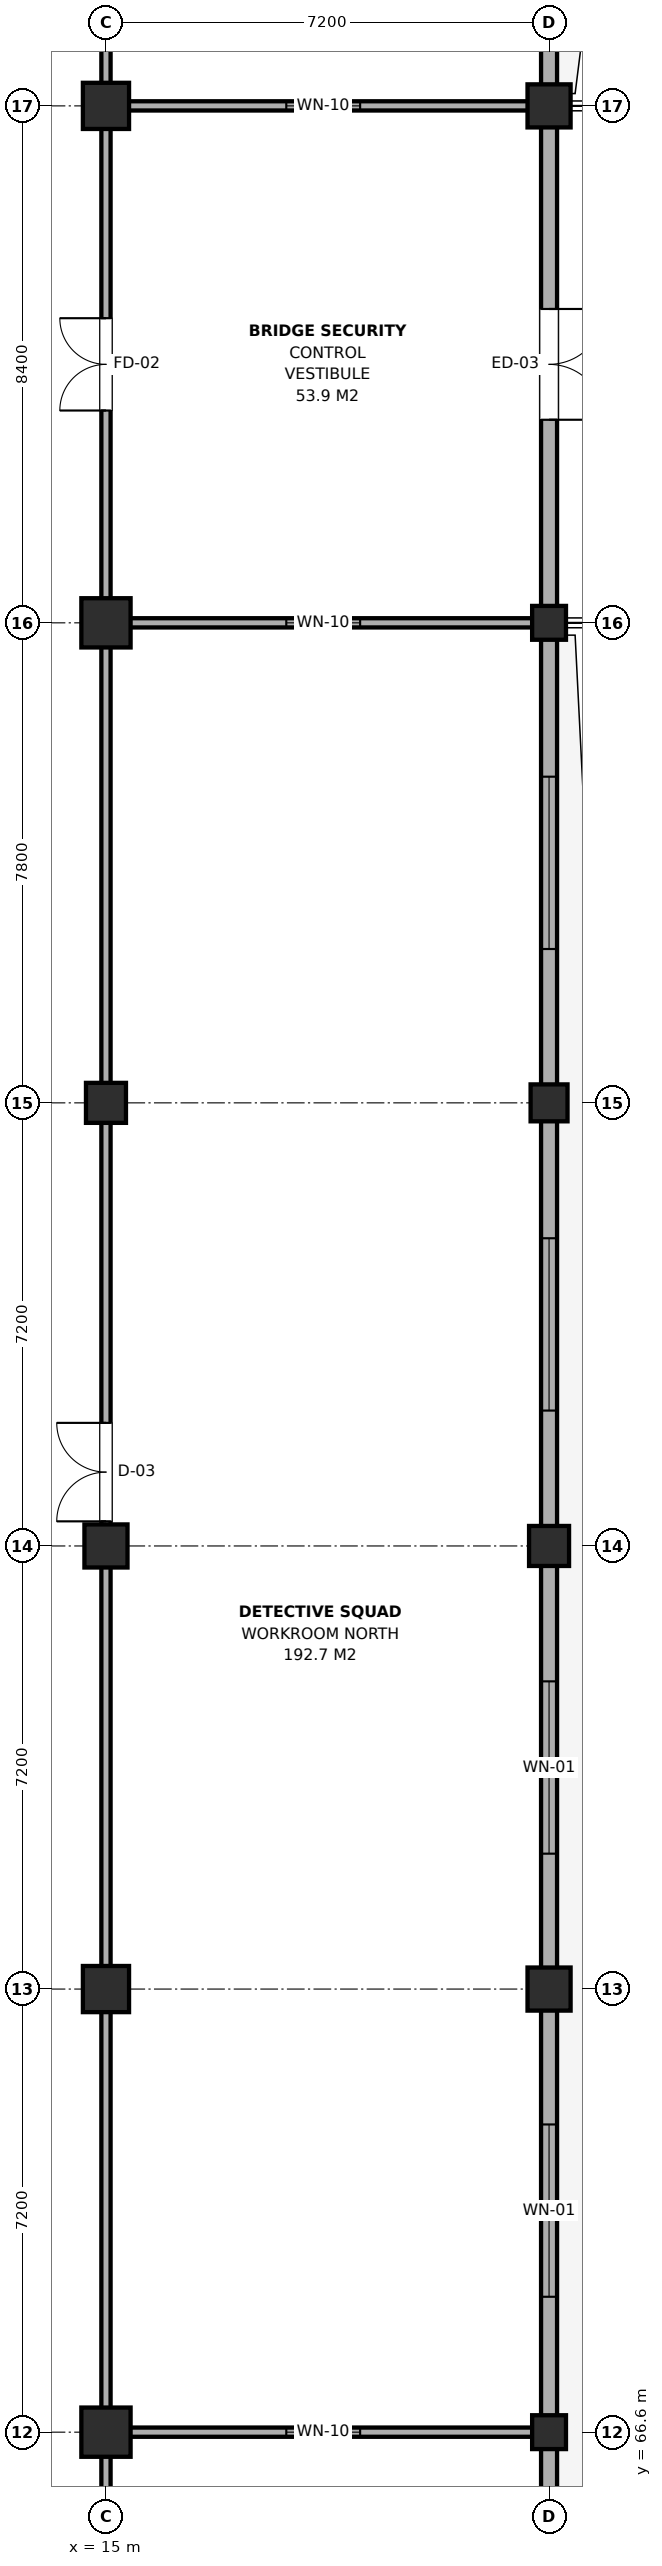
"""IFC4 building model, lengths in metres.
Left out: names, types, materials, properties, quantities, classifications, styles, units other than length and angle.
Written with IfcOpenShell. Run it as: python <this file> out.ifc"""

import sys

from ifc_helpers import new_model, si_unit, direction, frame, frame_2d, origin, origin_2d, place, context, subcontext, project, spatial, rectangle, extrude, element, fill, save


model = new_model("IFC4")
c1 = context("Model", 3, precision=1e-05, world=origin(), true_north=direction((0.0, 1.0)))
c2 = subcontext(c1, "Body", "Model", "MODEL_VIEW")
j1 = project(units=[si_unit("LENGTHUNIT", "METRE"), si_unit("PLANEANGLEUNIT", "RADIAN")], contexts=[c1])
p1 = place(None, origin())
s1 = spatial("IfcSite", under=j1, at=p1, CompositionType="ELEMENT")
p2 = place(p1, origin())
s2 = spatial("IfcBuilding", under=s1, at=p2, CompositionType="ELEMENT")
p3 = place(p2, frame((0.0, 0.0, 4.8)))
s3 = spatial("IfcBuildingStorey", under=s2, at=p3, CompositionType="ELEMENT", Elevation=4.8)
p4 = place(p3, frame((15.0, 66.6, 0.0), z_axis=(0.0, 0.0, 1.0), x_axis=(1.0, 0.0, 0.0)))
e1 = element("IfcColumn", 1, at=p4, inside=s3, PredefinedType="COLUMN", context=c2, shape_type="SweptSolid", body=[
    extrude(rectangle(XDim=0.8, YDim=0.8, at=origin_2d()), origin(), (0.0, 0.0, 1.0), 4.2),
])
p5 = place(p3, frame((15.0, 73.8, 0.0), z_axis=(0.0, 0.0, 1.0), x_axis=(1.0, 0.0, 0.0)))
e2 = element("IfcColumn", 2, at=p5, inside=s3, PredefinedType="COLUMN", context=c2, shape_type="SweptSolid", body=[
    extrude(rectangle(XDim=0.75, YDim=0.75, at=origin_2d()), origin(), (0.0, 0.0, 1.0), 4.2),
])
p6 = place(p3, frame((15.0, 81.0, 0.0), z_axis=(0.0, 0.0, 1.0), x_axis=(1.0, 0.0, 0.0)))
e3 = element("IfcColumn", 3, at=p6, inside=s3, PredefinedType="COLUMN", context=c2, shape_type="SweptSolid", body=[
    extrude(rectangle(XDim=0.7, YDim=0.7, at=origin_2d()), origin(), (0.0, 0.0, 1.0), 4.2),
])
p7 = place(p3, frame((15.0, 88.2, 0.0), z_axis=(0.0, 0.0, 1.0), x_axis=(1.0, 0.0, 0.0)))
e4 = element("IfcColumn", 4, at=p7, inside=s3, PredefinedType="COLUMN", context=c2, shape_type="SweptSolid", body=[
    extrude(rectangle(XDim=0.65, YDim=0.65, at=origin_2d()), origin(), (0.0, 0.0, 1.0), 4.2),
])
p8 = place(p3, frame((15.0, 96.0, 0.0), z_axis=(0.0, 0.0, 1.0), x_axis=(1.0, 0.0, 0.0)))
e5 = element("IfcColumn", 5, at=p8, inside=s3, PredefinedType="COLUMN", context=c2, shape_type="SweptSolid", body=[
    extrude(rectangle(XDim=0.8, YDim=0.8, at=origin_2d()), origin(), (0.0, 0.0, 1.0), 4.2),
])
p9 = place(p3, frame((15.0, 104.4, 0.0), z_axis=(0.0, 0.0, 1.0), x_axis=(1.0, 0.0, 0.0)))
e6 = element("IfcColumn", 6, at=p9, inside=s3, PredefinedType="COLUMN", context=c2, shape_type="SweptSolid", body=[
    extrude(rectangle(XDim=0.75, YDim=0.75, at=origin_2d()), origin(), (0.0, 0.0, 1.0), 4.2),
])
p10 = place(p3, frame((22.2, 66.6, 0.0), z_axis=(0.0, 0.0, 1.0), x_axis=(1.0, 0.0, 0.0)))
e7 = element("IfcColumn", 7, at=p10, inside=s3, PredefinedType="COLUMN", context=c2, shape_type="SweptSolid", body=[
    extrude(rectangle(XDim=0.55, YDim=0.55, at=origin_2d()), origin(), (0.0, 0.0, 1.0), 4.2),
])
p11 = place(p3, frame((22.2, 73.8, 0.0), z_axis=(0.0, 0.0, 1.0), x_axis=(1.0, 0.0, 0.0)))
e8 = element("IfcColumn", 8, at=p11, inside=s3, PredefinedType="COLUMN", context=c2, shape_type="SweptSolid", body=[
    extrude(rectangle(XDim=0.7, YDim=0.7, at=origin_2d()), origin(), (0.0, 0.0, 1.0), 4.2),
])
p12 = place(p3, frame((22.2, 81.0, 0.0), z_axis=(0.0, 0.0, 1.0), x_axis=(1.0, 0.0, 0.0)))
e9 = element("IfcColumn", 9, at=p12, inside=s3, PredefinedType="COLUMN", context=c2, shape_type="SweptSolid", body=[
    extrude(rectangle(XDim=0.65, YDim=0.65, at=origin_2d()), origin(), (0.0, 0.0, 1.0), 4.2),
])
p13 = place(p3, frame((22.2, 88.2, 0.0), z_axis=(0.0, 0.0, 1.0), x_axis=(1.0, 0.0, 0.0)))
e10 = element("IfcColumn", 10, at=p13, inside=s3, PredefinedType="COLUMN", context=c2, shape_type="SweptSolid", body=[
    extrude(rectangle(XDim=0.6, YDim=0.6, at=origin_2d()), origin(), (0.0, 0.0, 1.0), 4.2),
])
p14 = place(p3, frame((22.2, 96.0, 0.0), z_axis=(0.0, 0.0, 1.0), x_axis=(1.0, 0.0, 0.0)))
e11 = element("IfcColumn", 11, at=p14, inside=s3, PredefinedType="COLUMN", context=c2, shape_type="SweptSolid", body=[
    extrude(rectangle(XDim=0.55, YDim=0.55, at=origin_2d()), origin(), (0.0, 0.0, 1.0), 4.2),
])
p15 = place(p3, frame((22.2, 104.4, 0.0), z_axis=(0.0, 0.0, 1.0), x_axis=(1.0, 0.0, 0.0)))
e12 = element("IfcColumn", 12, at=p15, inside=s3, PredefinedType="COLUMN", context=c2, shape_type="SweptSolid", body=[
    extrude(rectangle(XDim=0.7, YDim=0.7, at=origin_2d()), origin(), (0.0, 0.0, 1.0), 4.2),
])
p16 = place(p3, frame((22.2, 58.8, 0.0), z_axis=(0.0, 0.0, 1.0), x_axis=(0.0, 1.0, 0.0)))
e13 = element("IfcWall", 13, at=p16, inside=s3, PredefinedType="SOLIDWALL", context=c2, shape_type="SweptSolid", body=[
    extrude(rectangle(XDim=7.8, YDim=0.26, at=frame_2d((3.9, 0.0))), origin(), (0.0, 0.0, 1.0), 3.425),
])
p17 = place(p16, frame((2.5, 0.0, 0.9)))
e14 = element("IfcOpeningElement", 14, at=p17, cuts=e13, PredefinedType="OPENING", context=c2, shape_type="SweptSolid", body=[
    extrude(rectangle(XDim=2.8, YDim=2.2, at=frame_2d((1.4, 1.1))), frame((0.0, 0.145, 0.0), z_axis=(0.0, -1.0, 0.0), x_axis=(1.0, 0.0, 0.0)), (0.0, 0.0, 1.0), 0.29),
])
p18 = place(p3, frame((22.2, 66.6, 0.0), z_axis=(0.0, 0.0, 1.0), x_axis=(0.0, 1.0, 0.0)))
e15 = element("IfcWall", 15, at=p18, inside=s3, PredefinedType="SOLIDWALL", context=c2, shape_type="SweptSolid", body=[
    extrude(rectangle(XDim=7.2, YDim=0.26, at=frame_2d((3.6, 0.0))), origin(), (0.0, 0.0, 1.0), 3.425),
])
p19 = place(p18, frame((2.2, 0.0, 0.9)))
e16 = element("IfcOpeningElement", 16, at=p19, cuts=e15, PredefinedType="OPENING", context=c2, shape_type="SweptSolid", body=[
    extrude(rectangle(XDim=2.8, YDim=2.2, at=frame_2d((1.4, 1.1))), frame((0.0, 0.145, 0.0), z_axis=(0.0, -1.0, 0.0), x_axis=(1.0, 0.0, 0.0)), (0.0, 0.0, 1.0), 0.29),
])
p20 = place(p3, frame((22.2, 73.8, 0.0), z_axis=(0.0, 0.0, 1.0), x_axis=(0.0, 1.0, 0.0)))
e17 = element("IfcWall", 17, at=p20, inside=s3, PredefinedType="SOLIDWALL", context=c2, shape_type="SweptSolid", body=[
    extrude(rectangle(XDim=7.2, YDim=0.26, at=frame_2d((3.6, 0.0))), origin(), (0.0, 0.0, 1.0), 3.525),
])
p21 = place(p20, frame((2.2, 0.0, 0.9)))
e18 = element("IfcOpeningElement", 18, at=p21, cuts=e17, PredefinedType="OPENING", context=c2, shape_type="SweptSolid", body=[
    extrude(rectangle(XDim=2.8, YDim=2.2, at=frame_2d((1.4, 1.1))), frame((0.0, 0.145, 0.0), z_axis=(0.0, -1.0, 0.0), x_axis=(1.0, 0.0, 0.0)), (0.0, 0.0, 1.0), 0.29),
])
p22 = place(p3, frame((22.2, 81.0, 0.0), z_axis=(0.0, 0.0, 1.0), x_axis=(0.0, 1.0, 0.0)))
e19 = element("IfcWall", 19, at=p22, inside=s3, PredefinedType="SOLIDWALL", context=c2, shape_type="SweptSolid", body=[
    extrude(rectangle(XDim=7.2, YDim=0.26, at=frame_2d((3.6, 0.0))), origin(), (0.0, 0.0, 1.0), 3.625),
])
p23 = place(p22, frame((2.2, 0.0, 0.9)))
e20 = element("IfcOpeningElement", 20, at=p23, cuts=e19, PredefinedType="OPENING", context=c2, shape_type="SweptSolid", body=[
    extrude(rectangle(XDim=2.8, YDim=2.2, at=frame_2d((1.4, 1.1))), frame((0.0, 0.145, 0.0), z_axis=(0.0, -1.0, 0.0), x_axis=(1.0, 0.0, 0.0)), (0.0, 0.0, 1.0), 0.29),
])
p24 = place(p3, frame((22.2, 88.2, 0.0), z_axis=(0.0, 0.0, 1.0), x_axis=(0.0, 1.0, 0.0)))
e21 = element("IfcWall", 21, at=p24, inside=s3, PredefinedType="SOLIDWALL", context=c2, shape_type="SweptSolid", body=[
    extrude(rectangle(XDim=7.8, YDim=0.26, at=frame_2d((3.9, 0.0))), origin(), (0.0, 0.0, 1.0), 3.485),
])
p25 = place(p24, frame((2.5, 0.0, 0.9)))
e22 = element("IfcOpeningElement", 22, at=p25, cuts=e21, PredefinedType="OPENING", context=c2, shape_type="SweptSolid", body=[
    extrude(rectangle(XDim=2.8, YDim=2.2, at=frame_2d((1.4, 1.1))), frame((0.0, 0.145, 0.0), z_axis=(0.0, -1.0, 0.0), x_axis=(1.0, 0.0, 0.0)), (0.0, 0.0, 1.0), 0.29),
])
p26 = place(p3, frame((22.2, 96.0, 0.0), z_axis=(0.0, 0.0, 1.0), x_axis=(0.0, 1.0, 0.0)))
e23 = element("IfcWall", 23, at=p26, inside=s3, PredefinedType="SOLIDWALL", context=c2, shape_type="SweptSolid", body=[
    extrude(rectangle(XDim=8.4, YDim=0.26, at=frame_2d((4.2, 0.0))), origin(), (0.0, 0.0, 1.0), 3.485),
])
p27 = place(p26, frame((3.3, 0.0, 0.0)))
e24 = element("IfcOpeningElement", 24, at=p27, cuts=e23, PredefinedType="OPENING", context=c2, shape_type="SweptSolid", body=[
    extrude(rectangle(XDim=1.8, YDim=2.2, at=frame_2d((0.9, 1.1))), frame((0.0, 0.145, 0.0), z_axis=(0.0, -1.0, 0.0), x_axis=(1.0, 0.0, 0.0)), (0.0, 0.0, 1.0), 0.29),
])
p28 = place(p3, frame((22.2, 104.4, 0.0), z_axis=(0.0, 0.0, 1.0), x_axis=(0.0, 1.0, 0.0)))
e25 = element("IfcWall", 25, at=p28, inside=s3, PredefinedType="SOLIDWALL", context=c2, shape_type="SweptSolid", body=[
    extrude(rectangle(XDim=9.0, YDim=0.26, at=frame_2d((4.5, 0.0))), origin(), (0.0, 0.0, 1.0), 3.535),
])
p29 = place(p28, frame((1.52, 0.0, 0.9)))
e26 = element("IfcOpeningElement", 26, at=p29, cuts=e25, PredefinedType="OPENING", context=c2, shape_type="SweptSolid", body=[
    extrude(rectangle(XDim=2.0, YDim=1.8, at=frame_2d((1.0, 0.9))), frame((0.0, 0.145, 0.0), z_axis=(0.0, -1.0, 0.0), x_axis=(1.0, 0.0, 0.0)), (0.0, 0.0, 1.0), 0.29),
])
p30 = place(p28, frame((5.48, 0.0, 0.9)))
e27 = element("IfcOpeningElement", 27, at=p30, cuts=e25, PredefinedType="OPENING", context=c2, shape_type="SweptSolid", body=[
    extrude(rectangle(XDim=2.0, YDim=1.8, at=frame_2d((1.0, 0.9))), frame((0.0, 0.145, 0.0), z_axis=(0.0, -1.0, 0.0), x_axis=(1.0, 0.0, 0.0)), (0.0, 0.0, 1.0), 0.29),
])
p31 = place(p3, frame((15.0, 42.0, 0.0), z_axis=(0.0, 0.0, 1.0), x_axis=(0.0, 1.0, 0.0)))
e28 = element("IfcWall", 28, at=p31, inside=s3, PredefinedType="PARTITIONING", context=c2, shape_type="SweptSolid", body=[
    extrude(rectangle(XDim=24.6, YDim=0.15, at=frame_2d((12.3, 0.0))), origin(), (0.0, 0.0, 1.0), 3.375),
])
p32 = place(p31, frame((11.95, 0.0, 0.0)))
e29 = element("IfcOpeningElement", 29, at=p32, cuts=e28, PredefinedType="OPENING", context=c2, shape_type="SweptSolid", body=[
    extrude(rectangle(XDim=1.6, YDim=2.15, at=frame_2d((0.8, 1.075))), frame((0.0, 0.09, 0.0), z_axis=(0.0, -1.0, 0.0), x_axis=(1.0, 0.0, 0.0)), (0.0, 0.0, 1.0), 0.18),
])
p33 = place(p3, frame((15.0, 66.6, 0.0), z_axis=(0.0, 0.0, 1.0), x_axis=(0.0, 1.0, 0.0)))
e30 = element("IfcWall", 30, at=p33, inside=s3, PredefinedType="PARTITIONING", context=c2, shape_type="SweptSolid", body=[
    extrude(rectangle(XDim=29.4, YDim=0.15, at=frame_2d((14.7, 0.0))), origin(), (0.0, 0.0, 1.0), 3.475),
])
p34 = place(p33, frame((14.8, 0.0, 0.0)))
e31 = element("IfcOpeningElement", 31, at=p34, cuts=e30, PredefinedType="OPENING", context=c2, shape_type="SweptSolid", body=[
    extrude(rectangle(XDim=1.6, YDim=2.15, at=frame_2d((0.8, 1.075))), frame((0.0, 0.09, 0.0), z_axis=(0.0, -1.0, 0.0), x_axis=(1.0, 0.0, 0.0)), (0.0, 0.0, 1.0), 0.18),
])
p35 = place(p3, frame((15.0, 66.6, 0.0), z_axis=(0.0, 0.0, 1.0), x_axis=(1.0, 0.0, 0.0)))
e32 = element("IfcWall", 32, at=p35, inside=s3, PredefinedType="PARTITIONING", context=c2, shape_type="SweptSolid", body=[
    extrude(rectangle(XDim=7.06, YDim=0.15, at=frame_2d((3.53, 0.0))), origin(), (0.0, 0.0, 1.0), 3.625),
])
p36 = place(p35, frame((2.93, 0.0, 0.95)))
e33 = element("IfcOpeningElement", 33, at=p36, cuts=e32, PredefinedType="OPENING", context=c2, shape_type="SweptSolid", body=[
    extrude(rectangle(XDim=1.2, YDim=1.5, at=frame_2d((0.6, 0.75))), frame((0.0, 0.09, 0.0), z_axis=(0.0, -1.0, 0.0), x_axis=(1.0, 0.0, 0.0)), (0.0, 0.0, 1.0), 0.18),
])
p37 = place(p3, frame((15.0, 96.0, 0.0), z_axis=(0.0, 0.0, 1.0), x_axis=(0.0, 1.0, 0.0)))
e34 = element("IfcWall", 34, at=p37, inside=s3, PredefinedType="PARTITIONING", context=c2, shape_type="SweptSolid", body=[
    extrude(rectangle(XDim=8.4, YDim=0.15, at=frame_2d((4.2, 0.0))), origin(), (0.0, 0.0, 1.0), 3.485),
])
p38 = place(p37, frame((3.45, 0.0, 0.0)))
e35 = element("IfcOpeningElement", 35, at=p38, cuts=e34, PredefinedType="OPENING", context=c2, shape_type="SweptSolid", body=[
    extrude(rectangle(XDim=1.5, YDim=2.15, at=frame_2d((0.75, 1.075))), frame((0.0, 0.09, 0.0), z_axis=(0.0, -1.0, 0.0), x_axis=(1.0, 0.0, 0.0)), (0.0, 0.0, 1.0), 0.18),
])
p39 = place(p3, frame((15.0, 96.0, 0.0), z_axis=(0.0, 0.0, 1.0), x_axis=(1.0, 0.0, 0.0)))
e36 = element("IfcWall", 36, at=p39, inside=s3, PredefinedType="PARTITIONING", context=c2, shape_type="SweptSolid", body=[
    extrude(rectangle(XDim=7.06, YDim=0.15, at=frame_2d((3.53, 0.0))), origin(), (0.0, 0.0, 1.0), 3.625),
])
p40 = place(p39, frame((2.93, 0.0, 0.95)))
e37 = element("IfcOpeningElement", 37, at=p40, cuts=e36, PredefinedType="OPENING", context=c2, shape_type="SweptSolid", body=[
    extrude(rectangle(XDim=1.2, YDim=1.5, at=frame_2d((0.6, 0.75))), frame((0.0, 0.09, 0.0), z_axis=(0.0, -1.0, 0.0), x_axis=(1.0, 0.0, 0.0)), (0.0, 0.0, 1.0), 0.18),
])
p41 = place(p3, frame((15.0, 104.4, 0.0), z_axis=(0.0, 0.0, 1.0), x_axis=(0.0, 1.0, 0.0)))
e38 = element("IfcWall", 38, at=p41, inside=s3, PredefinedType="PARTITIONING", context=c2, shape_type="SweptSolid", body=[
    extrude(rectangle(XDim=18.0, YDim=0.15, at=frame_2d((9.0, 0.0))), origin(), (0.0, 0.0, 1.0), 3.535),
])
p42 = place(p41, frame((9.375, 0.0, 0.0)))
e39 = element("IfcOpeningElement", 39, at=p42, cuts=e38, PredefinedType="OPENING", context=c2, shape_type="SweptSolid", body=[
    extrude(rectangle(XDim=1.05, YDim=2.15, at=frame_2d((0.525, 1.075))), frame((0.0, 0.09, 0.0), z_axis=(0.0, -1.0, 0.0), x_axis=(1.0, 0.0, 0.0)), (0.0, 0.0, 1.0), 0.18),
])
p43 = place(p41, frame((3.2, 0.0, 0.95)))
e40 = element("IfcOpeningElement", 40, at=p43, cuts=e38, PredefinedType="OPENING", context=c2, shape_type="SweptSolid", body=[
    extrude(rectangle(XDim=2.6, YDim=1.5, at=frame_2d((1.3, 0.75))), frame((0.0, 0.09, 0.0), z_axis=(0.0, -1.0, 0.0), x_axis=(1.0, 0.0, 0.0)), (0.0, 0.0, 1.0), 0.18),
])
p44 = place(p41, frame((12.2, 0.0, 0.95)))
e41 = element("IfcOpeningElement", 41, at=p44, cuts=e38, PredefinedType="OPENING", context=c2, shape_type="SweptSolid", body=[
    extrude(rectangle(XDim=2.6, YDim=1.5, at=frame_2d((1.3, 0.75))), frame((0.0, 0.09, 0.0), z_axis=(0.0, -1.0, 0.0), x_axis=(1.0, 0.0, 0.0)), (0.0, 0.0, 1.0), 0.18),
])
p45 = place(p3, frame((15.0, 104.4, 0.0), z_axis=(0.0, 0.0, 1.0), x_axis=(1.0, 0.0, 0.0)))
e42 = element("IfcWall", 42, at=p45, inside=s3, PredefinedType="PARTITIONING", context=c2, shape_type="SweptSolid", body=[
    extrude(rectangle(XDim=7.06, YDim=0.15, at=frame_2d((3.53, 0.0))), origin(), (0.0, 0.0, 1.0), 3.645),
])
p46 = place(p45, frame((2.93, 0.0, 0.95)))
e43 = element("IfcOpeningElement", 43, at=p46, cuts=e42, PredefinedType="OPENING", context=c2, shape_type="SweptSolid", body=[
    extrude(rectangle(XDim=1.2, YDim=1.5, at=frame_2d((0.6, 0.75))), frame((0.0, 0.09, 0.0), z_axis=(0.0, -1.0, 0.0), x_axis=(1.0, 0.0, 0.0)), (0.0, 0.0, 1.0), 0.18),
])
p47 = place(p19, origin())
e44 = element("IfcWindow", 44, at=p47, inside=s3, PartitioningType="SINGLE_PANEL", PredefinedType="WINDOW", context=c2, shape_type="SweptSolid", body=[
    extrude(rectangle(XDim=2.8, YDim=2.2, at=frame_2d((1.4, 1.1))), frame((0.0, 0.03, 0.0), z_axis=(0.0, -1.0, 0.0), x_axis=(1.0, 0.0, 0.0)), (0.0, 0.0, 1.0), 0.06),
])
fill(e16, e44)
p48 = place(p21, origin())
e45 = element("IfcWindow", 45, at=p48, inside=s3, PartitioningType="SINGLE_PANEL", PredefinedType="WINDOW", context=c2, shape_type="SweptSolid", body=[
    extrude(rectangle(XDim=2.8, YDim=2.2, at=frame_2d((1.4, 1.1))), frame((0.0, 0.03, 0.0), z_axis=(0.0, -1.0, 0.0), x_axis=(1.0, 0.0, 0.0)), (0.0, 0.0, 1.0), 0.06),
])
fill(e18, e45)
p49 = place(p23, origin())
e46 = element("IfcWindow", 46, at=p49, inside=s3, PartitioningType="SINGLE_PANEL", PredefinedType="WINDOW", context=c2, shape_type="SweptSolid", body=[
    extrude(rectangle(XDim=2.8, YDim=2.2, at=frame_2d((1.4, 1.1))), frame((0.0, 0.03, 0.0), z_axis=(0.0, -1.0, 0.0), x_axis=(1.0, 0.0, 0.0)), (0.0, 0.0, 1.0), 0.06),
])
fill(e20, e46)
p50 = place(p25, origin())
e47 = element("IfcWindow", 47, at=p50, inside=s3, PartitioningType="SINGLE_PANEL", PredefinedType="WINDOW", context=c2, shape_type="SweptSolid", body=[
    extrude(rectangle(XDim=2.8, YDim=2.2, at=frame_2d((1.4, 1.1))), frame((0.0, 0.03, 0.0), z_axis=(0.0, -1.0, 0.0), x_axis=(1.0, 0.0, 0.0)), (0.0, 0.0, 1.0), 0.06),
])
fill(e22, e47)
p51 = place(p27, frame((1.8, 0.0, 0.0), z_axis=(0.0, 0.0, 1.0), x_axis=(-1.0, 0.0, 0.0)))
e48 = element("IfcDoor", 48, at=p51, inside=s3, OperationType="DOUBLE_DOOR_SINGLE_SWING", PredefinedType="DOOR", context=c2, shape_type="SweptSolid", body=[
    extrude(rectangle(XDim=1.8, YDim=2.2, at=frame_2d((0.9, 1.1))), frame((0.0, 0.025, 0.0), z_axis=(0.0, -1.0, 0.0), x_axis=(1.0, 0.0, 0.0)), (0.0, 0.0, 1.0), 0.05),
])
fill(e24, e48)
p52 = place(p34, origin())
e49 = element("IfcDoor", 49, at=p52, inside=s3, OperationType="DOUBLE_DOOR_SINGLE_SWING", PredefinedType="DOOR", context=c2, shape_type="SweptSolid", body=[
    extrude(rectangle(XDim=1.6, YDim=2.15, at=frame_2d((0.8, 1.075))), frame((0.0, 0.025, 0.0), z_axis=(0.0, -1.0, 0.0), x_axis=(1.0, 0.0, 0.0)), (0.0, 0.0, 1.0), 0.05),
])
fill(e31, e49)
p53 = place(p36, origin())
e50 = element("IfcWindow", 50, at=p53, inside=s3, PartitioningType="SINGLE_PANEL", PredefinedType="WINDOW", context=c2, shape_type="SweptSolid", body=[
    extrude(rectangle(XDim=1.2, YDim=1.5, at=frame_2d((0.6, 0.75))), frame((0.0, 0.03, 0.0), z_axis=(0.0, -1.0, 0.0), x_axis=(1.0, 0.0, 0.0)), (0.0, 0.0, 1.0), 0.06),
])
fill(e33, e50)
p54 = place(p38, origin())
e51 = element("IfcDoor", 51, at=p54, inside=s3, OperationType="DOUBLE_DOOR_SINGLE_SWING", PredefinedType="DOOR", context=c2, shape_type="SweptSolid", body=[
    extrude(rectangle(XDim=1.5, YDim=2.15, at=frame_2d((0.75, 1.075))), frame((0.0, 0.025, 0.0), z_axis=(0.0, -1.0, 0.0), x_axis=(1.0, 0.0, 0.0)), (0.0, 0.0, 1.0), 0.05),
])
fill(e35, e51)
p55 = place(p40, origin())
e52 = element("IfcWindow", 52, at=p55, inside=s3, PartitioningType="SINGLE_PANEL", PredefinedType="WINDOW", context=c2, shape_type="SweptSolid", body=[
    extrude(rectangle(XDim=1.2, YDim=1.5, at=frame_2d((0.6, 0.75))), frame((0.0, 0.03, 0.0), z_axis=(0.0, -1.0, 0.0), x_axis=(1.0, 0.0, 0.0)), (0.0, 0.0, 1.0), 0.06),
])
fill(e37, e52)
p56 = place(p46, origin())
e53 = element("IfcWindow", 53, at=p56, inside=s3, PartitioningType="SINGLE_PANEL", PredefinedType="WINDOW", context=c2, shape_type="SweptSolid", body=[
    extrude(rectangle(XDim=1.2, YDim=1.5, at=frame_2d((0.6, 0.75))), frame((0.0, 0.03, 0.0), z_axis=(0.0, -1.0, 0.0), x_axis=(1.0, 0.0, 0.0)), (0.0, 0.0, 1.0), 0.06),
])
fill(e43, e53)
save(model, sys.argv[1])
